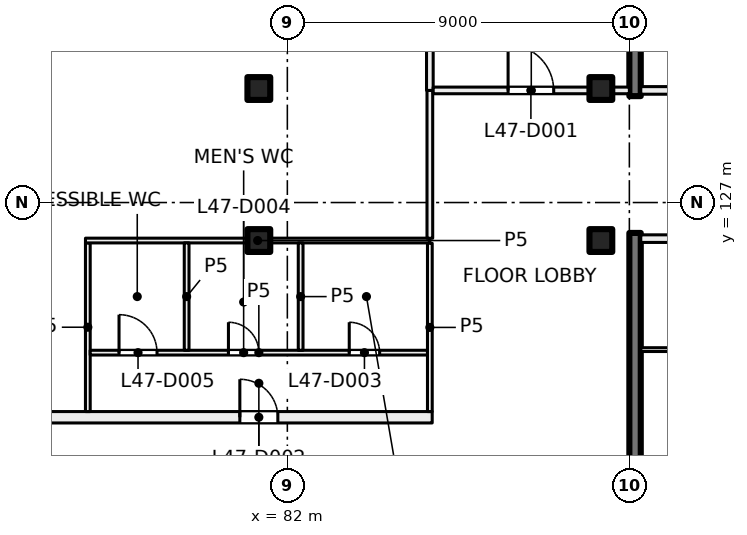
"""IFC4 building model, lengths in metres.
Left out: names, types, materials, properties, quantities, classifications, styles, units other than length and angle.
Written with IfcOpenShell. Run it as: python <this file> out.ifc"""

import sys

from ifc_helpers import new_model, si_unit, direction, frame, frame_2d, origin, origin_2d, place, context, subcontext, project, spatial, rectangle, extrude, element, fill, save


model = new_model("IFC4")
c1 = context("Model", 3, precision=1e-05, world=origin(), true_north=direction((0.0, 1.0)))
c2 = subcontext(c1, "Body", "Model", "MODEL_VIEW")
j1 = project(units=[si_unit("LENGTHUNIT", "METRE"), si_unit("PLANEANGLEUNIT", "RADIAN")], contexts=[c1])
p1 = place(None, origin())
s1 = spatial("IfcSite", under=j1, at=p1, CompositionType="ELEMENT")
p2 = place(p1, origin())
s2 = spatial("IfcBuilding", under=s1, at=p2, CompositionType="ELEMENT")
p3 = place(p2, frame((0.0, 0.0, 200.0)))
s3 = spatial("IfcBuildingStorey", under=s2, at=p3, CompositionType="ELEMENT", Elevation=200.0)
for number, where, z_axis, x_axis in (
    (1, (81.25, 130.0, 0.0), (0.0, 0.0, 1.0), (1.0, 0.0, 0.0)),
    (2, (90.25, 130.0, 0.0), (0.0, 0.0, 1.0), (1.0, 0.0, 0.0)),
    (3, (81.25, 126.0, 0.0), (0.0, 0.0, 1.0), (1.0, 0.0, 0.0)),
    (4, (90.25, 126.0, 0.0), (0.0, 0.0, 1.0), (1.0, 0.0, 0.0)),
):
    element("IfcColumn", number, at=place(p3, frame(where, z_axis=z_axis, x_axis=x_axis)), inside=s3, PredefinedType="COLUMN", context=c2, shape_type="SweptSolid", body=[
        extrude(rectangle(XDim=0.6, YDim=0.6, at=origin_2d()), origin(), (0.0, 0.0, 1.0), 4.0),
    ])
for number, where, z_axis, x_axis in (
    (5, (91.15, 138.5, 0.0), (0.0, 0.0, 1.0), (0.0, -1.0, 0.0)),
    (6, (91.15, 126.2, 0.0), (0.0, 0.0, 1.0), (0.0, -1.0, 0.0)),
):
    element("IfcWall", number, at=place(p3, frame(where, z_axis=z_axis, x_axis=x_axis)), inside=s3, PredefinedType="SHEAR", context=c2, shape_type="SweptSolid", body=[
        extrude(rectangle(XDim=8.7, YDim=0.3, at=frame_2d((4.35, 0.0))), origin(), (0.0, 0.0, 1.0), 4.0),
    ])
p4 = place(p3, frame((95.25, 126.05, 0.0), z_axis=(0.0, 0.0, 1.0), x_axis=(-1.0, 0.0, 0.0)))
e7 = element("IfcWall", 7, at=p4, inside=s3, PredefinedType="PARTITIONING", context=c2, shape_type="SweptSolid", body=[
    extrude(rectangle(XDim=3.95, YDim=0.2, at=frame_2d((1.975, 0.0))), origin(), (0.0, 0.0, 1.0), 3.625),
])
p5 = place(p4, frame((0.3, 0.0, 0.0)))
e8 = element("IfcOpeningElement", 8, at=p5, cuts=e7, PredefinedType="OPENING", context=c2, shape_type="SweptSolid", body=[
    extrude(rectangle(XDim=1.2, YDim=2.1, at=frame_2d((0.6, 1.05))), frame((0.0, 0.11, 0.0), z_axis=(0.0, -1.0, 0.0), x_axis=(1.0, 0.0, 0.0)), (0.0, 0.0, 1.0), 0.22),
])
p6 = place(p3, frame((93.4, 123.13, 0.0), z_axis=(0.0, 0.0, 1.0), x_axis=(-1.0, 0.0, 0.0)))
e9 = element("IfcWall", 9, at=p6, inside=s3, PredefinedType="PARTITIONING", context=c2, shape_type="SweptSolid", body=[
    extrude(rectangle(XDim=2.1, YDim=0.1, at=frame_2d((1.05, 0.0))), origin(), (0.0, 0.0, 1.0), 3.625),
])
p7 = place(p3, frame((91.3, 129.95, 0.0), z_axis=(0.0, 0.0, 1.0), x_axis=(1.0, 0.0, 0.0)))
e10 = element("IfcWall", 10, at=p7, inside=s3, PredefinedType="PARTITIONING", context=c2, shape_type="SweptSolid", body=[
    extrude(rectangle(XDim=3.95, YDim=0.2, at=frame_2d((1.975, 0.0))), origin(), (0.0, 0.0, 1.0), 3.625),
])
p8 = place(p7, frame((2.45, 0.0, 0.0)))
e11 = element("IfcOpeningElement", 11, at=p8, cuts=e10, PredefinedType="OPENING", context=c2, shape_type="SweptSolid", body=[
    extrude(rectangle(XDim=1.2, YDim=2.1, at=frame_2d((0.6, 1.05))), frame((0.0, 0.11, 0.0), z_axis=(0.0, -1.0, 0.0), x_axis=(1.0, 0.0, 0.0)), (0.0, 0.0, 1.0), 0.22),
])
p9 = place(p3, frame((50.506, 121.35, 0.0), z_axis=(0.0, 0.0, 1.0), x_axis=(1.0, 0.0, 0.0)))
e12 = element("IfcWall", 12, at=p9, inside=s3, PredefinedType="PARTITIONING", context=c2, shape_type="SweptSolid", body=[
    extrude(rectangle(XDim=35.306, YDim=0.3, at=frame_2d((17.653, 0.0))), origin(), (0.0, 0.0, 1.0), 3.625),
])
p10 = place(p9, frame((30.244, 0.0, 0.0)))
e13 = element("IfcOpeningElement", 13, at=p10, cuts=e12, PredefinedType="OPENING", context=c2, shape_type="SweptSolid", body=[
    extrude(rectangle(XDim=1.0, YDim=2.1, at=frame_2d((0.5, 1.05))), frame((0.0, 0.16, 0.0), z_axis=(0.0, -1.0, 0.0), x_axis=(1.0, 0.0, 0.0)), (0.0, 0.0, 1.0), 0.32),
])
p11 = place(p9, frame((14.094, 0.0, 0.0)))
e14 = element("IfcOpeningElement", 14, at=p11, cuts=e12, PredefinedType="OPENING", context=c2, shape_type="SweptSolid", body=[
    extrude(rectangle(XDim=1.8, YDim=2.1, at=frame_2d((0.9, 1.05))), frame((0.0, 0.16, 0.0), z_axis=(0.0, -1.0, 0.0), x_axis=(1.0, 0.0, 0.0)), (0.0, 0.0, 1.0), 0.32),
])
p12 = place(p9, frame((1.047, 0.0, 0.0)))
e15 = element("IfcOpeningElement", 15, at=p12, cuts=e12, PredefinedType="OPENING", context=c2, shape_type="SweptSolid", body=[
    extrude(rectangle(XDim=1.8, YDim=2.1, at=frame_2d((0.9, 1.05))), frame((0.0, 0.16, 0.0), z_axis=(0.0, -1.0, 0.0), x_axis=(1.0, 0.0, 0.0)), (0.0, 0.0, 1.0), 0.32),
])
p13 = place(p3, frame((76.75, 121.5, 0.0), z_axis=(0.0, 0.0, 1.0), x_axis=(0.0, 1.0, 0.0)))
e16 = element("IfcWall", 16, at=p13, inside=s3, PredefinedType="PARTITIONING", context=c2, shape_type="SweptSolid", body=[
    extrude(rectangle(XDim=4.438, YDim=0.125, at=frame_2d((2.219, 0.0))), origin(), (0.0, 0.0, 1.0), 3.625),
])
p14 = place(p3, frame((76.812, 123.05, 0.0), z_axis=(0.0, 0.0, 1.0), x_axis=(1.0, 0.0, 0.0)))
e17 = element("IfcWall", 17, at=p14, inside=s3, PredefinedType="PARTITIONING", context=c2, shape_type="SweptSolid", body=[
    extrude(rectangle(XDim=8.876, YDim=0.125, at=frame_2d((4.438, 0.0))), origin(), (0.0, 0.0, 1.0), 3.625),
])
p15 = place(p14, frame((6.817, 0.0, 0.0)))
e18 = element("IfcOpeningElement", 18, at=p15, cuts=e17, PredefinedType="OPENING", context=c2, shape_type="SweptSolid", body=[
    extrude(rectangle(XDim=0.8, YDim=2.1, at=frame_2d((0.4, 1.05))), frame((0.0, 0.073, 0.0), z_axis=(0.0, -1.0, 0.0), x_axis=(1.0, 0.0, 0.0)), (0.0, 0.0, 1.0), 0.145),
])
p16 = place(p14, frame((3.638, 0.0, 0.0)))
e19 = element("IfcOpeningElement", 19, at=p16, cuts=e17, PredefinedType="OPENING", context=c2, shape_type="SweptSolid", body=[
    extrude(rectangle(XDim=0.8, YDim=2.1, at=frame_2d((0.4, 1.05))), frame((0.0, 0.073, 0.0), z_axis=(0.0, -1.0, 0.0), x_axis=(1.0, 0.0, 0.0)), (0.0, 0.0, 1.0), 0.145),
])
p17 = place(p14, frame((0.759, 0.0, 0.0)))
e20 = element("IfcOpeningElement", 20, at=p17, cuts=e17, PredefinedType="OPENING", context=c2, shape_type="SweptSolid", body=[
    extrude(rectangle(XDim=1.0, YDim=2.1, at=frame_2d((0.5, 1.05))), frame((0.0, 0.073, 0.0), z_axis=(0.0, -1.0, 0.0), x_axis=(1.0, 0.0, 0.0)), (0.0, 0.0, 1.0), 0.145),
])
p18 = place(p3, frame((76.688, 126.0, 0.0), z_axis=(0.0, 0.0, 1.0), x_axis=(1.0, 0.0, 0.0)))
e21 = element("IfcWall", 21, at=p18, inside=s3, PredefinedType="PARTITIONING", context=c2, shape_type="SweptSolid", body=[
    extrude(rectangle(XDim=9.062, YDim=0.125, at=frame_2d((4.531, 0.0))), origin(), (0.0, 0.0, 1.0), 3.625),
])
for number, where, z_axis, x_axis in (
    (22, (79.35, 125.938, 0.0), (0.0, 0.0, 1.0), (0.0, -1.0, 0.0)),
    (23, (82.35, 125.938, 0.0), (0.0, 0.0, 1.0), (0.0, -1.0, 0.0)),
):
    element("IfcWall", number, at=place(p3, frame(where, z_axis=z_axis, x_axis=x_axis)), inside=s3, PredefinedType="PARTITIONING", context=c2, shape_type="SweptSolid", body=[
        extrude(rectangle(XDim=2.826, YDim=0.125, at=frame_2d((1.413, 0.0))), origin(), (0.0, 0.0, 1.0), 3.625),
    ])
p19 = place(p3, frame((85.75, 121.5, 0.0), z_axis=(0.0, 0.0, 1.0), x_axis=(0.0, 1.0, 0.0)))
e24 = element("IfcWall", 24, at=p19, inside=s3, PredefinedType="PARTITIONING", context=c2, shape_type="SweptSolid", body=[
    extrude(rectangle(XDim=4.428, YDim=0.125, at=frame_2d((2.214, 0.0))), origin(), (0.0, 0.0, 1.0), 3.625),
])
p20 = place(p3, frame((85.75, 126.06, 0.0), z_axis=(0.0, 0.0, 1.0), x_axis=(0.0, 1.0, 0.0)))
e25 = element("IfcWall", 25, at=p20, inside=s3, PredefinedType="PARTITIONING", context=c2, shape_type="SweptSolid", body=[
    extrude(rectangle(XDim=3.89, YDim=0.15, at=frame_2d((1.945, 0.0))), origin(), (0.0, 0.0, 1.0), 3.625),
])
p21 = place(p3, frame((85.75, 129.95, 0.0), z_axis=(0.0, 0.0, 1.0), x_axis=(0.0, 1.0, 0.0)))
e26 = element("IfcWall", 26, at=p21, inside=s3, PredefinedType="PARTITIONING", context=c2, shape_type="SweptSolid", body=[
    extrude(rectangle(XDim=8.45, YDim=0.175, at=frame_2d((4.225, 0.0))), origin(), (0.0, 0.0, 1.0), 3.625),
])
p22 = place(p3, frame((85.838, 129.95, 0.0), z_axis=(0.0, 0.0, 1.0), x_axis=(1.0, 0.0, 0.0)))
e27 = element("IfcWall", 27, at=p22, inside=s3, PredefinedType="PARTITIONING", context=c2, shape_type="SweptSolid", body=[
    extrude(rectangle(XDim=5.162, YDim=0.175, at=frame_2d((2.581, 0.0))), origin(), (0.0, 0.0, 1.0), 3.625),
])
p23 = place(p22, frame((1.971, 0.0, 0.0)))
e28 = element("IfcOpeningElement", 28, at=p23, cuts=e27, PredefinedType="OPENING", context=c2, shape_type="SweptSolid", body=[
    extrude(rectangle(XDim=1.2, YDim=2.1, at=frame_2d((0.6, 1.05))), frame((0.0, 0.097, 0.0), z_axis=(0.0, -1.0, 0.0), x_axis=(1.0, 0.0, 0.0)), (0.0, 0.0, 1.0), 0.195),
])
p24 = place(p23, origin())
e29 = element("IfcDoor", 29, at=p24, inside=s3, OperationType="DOUBLE_DOOR_SINGLE_SWING", PredefinedType="DOOR", context=c2, shape_type="SweptSolid", body=[
    extrude(rectangle(XDim=1.2, YDim=2.1, at=frame_2d((0.6, 1.05))), frame((0.0, 0.025, 0.0), z_axis=(0.0, -1.0, 0.0), x_axis=(1.0, 0.0, 0.0)), (0.0, 0.0, 1.0), 0.05),
])
fill(e28, e29)
p25 = place(p10, origin())
e30 = element("IfcDoor", 30, at=p25, inside=s3, OperationType="SINGLE_SWING_LEFT", PredefinedType="DOOR", context=c2, shape_type="SweptSolid", body=[
    extrude(rectangle(XDim=1.0, YDim=2.1, at=frame_2d((0.5, 1.05))), frame((0.0, 0.025, 0.0), z_axis=(0.0, -1.0, 0.0), x_axis=(1.0, 0.0, 0.0)), (0.0, 0.0, 1.0), 0.05),
])
fill(e13, e30)
p26 = place(p15, origin())
e31 = element("IfcDoor", 31, at=p26, inside=s3, OperationType="SINGLE_SWING_RIGHT", PredefinedType="DOOR", context=c2, shape_type="SweptSolid", body=[
    extrude(rectangle(XDim=0.8, YDim=2.1, at=frame_2d((0.4, 1.05))), frame((0.0, 0.025, 0.0), z_axis=(0.0, -1.0, 0.0), x_axis=(1.0, 0.0, 0.0)), (0.0, 0.0, 1.0), 0.05),
])
fill(e18, e31)
p27 = place(p16, origin())
e32 = element("IfcDoor", 32, at=p27, inside=s3, OperationType="SINGLE_SWING_LEFT", PredefinedType="DOOR", context=c2, shape_type="SweptSolid", body=[
    extrude(rectangle(XDim=0.8, YDim=2.1, at=frame_2d((0.4, 1.05))), frame((0.0, 0.025, 0.0), z_axis=(0.0, -1.0, 0.0), x_axis=(1.0, 0.0, 0.0)), (0.0, 0.0, 1.0), 0.05),
])
fill(e19, e32)
p28 = place(p17, origin())
e33 = element("IfcDoor", 33, at=p28, inside=s3, OperationType="SINGLE_SWING_LEFT", PredefinedType="DOOR", context=c2, shape_type="SweptSolid", body=[
    extrude(rectangle(XDim=1.0, YDim=2.1, at=frame_2d((0.5, 1.05))), frame((0.0, 0.025, 0.0), z_axis=(0.0, -1.0, 0.0), x_axis=(1.0, 0.0, 0.0)), (0.0, 0.0, 1.0), 0.05),
])
fill(e20, e33)
save(model, sys.argv[1])
